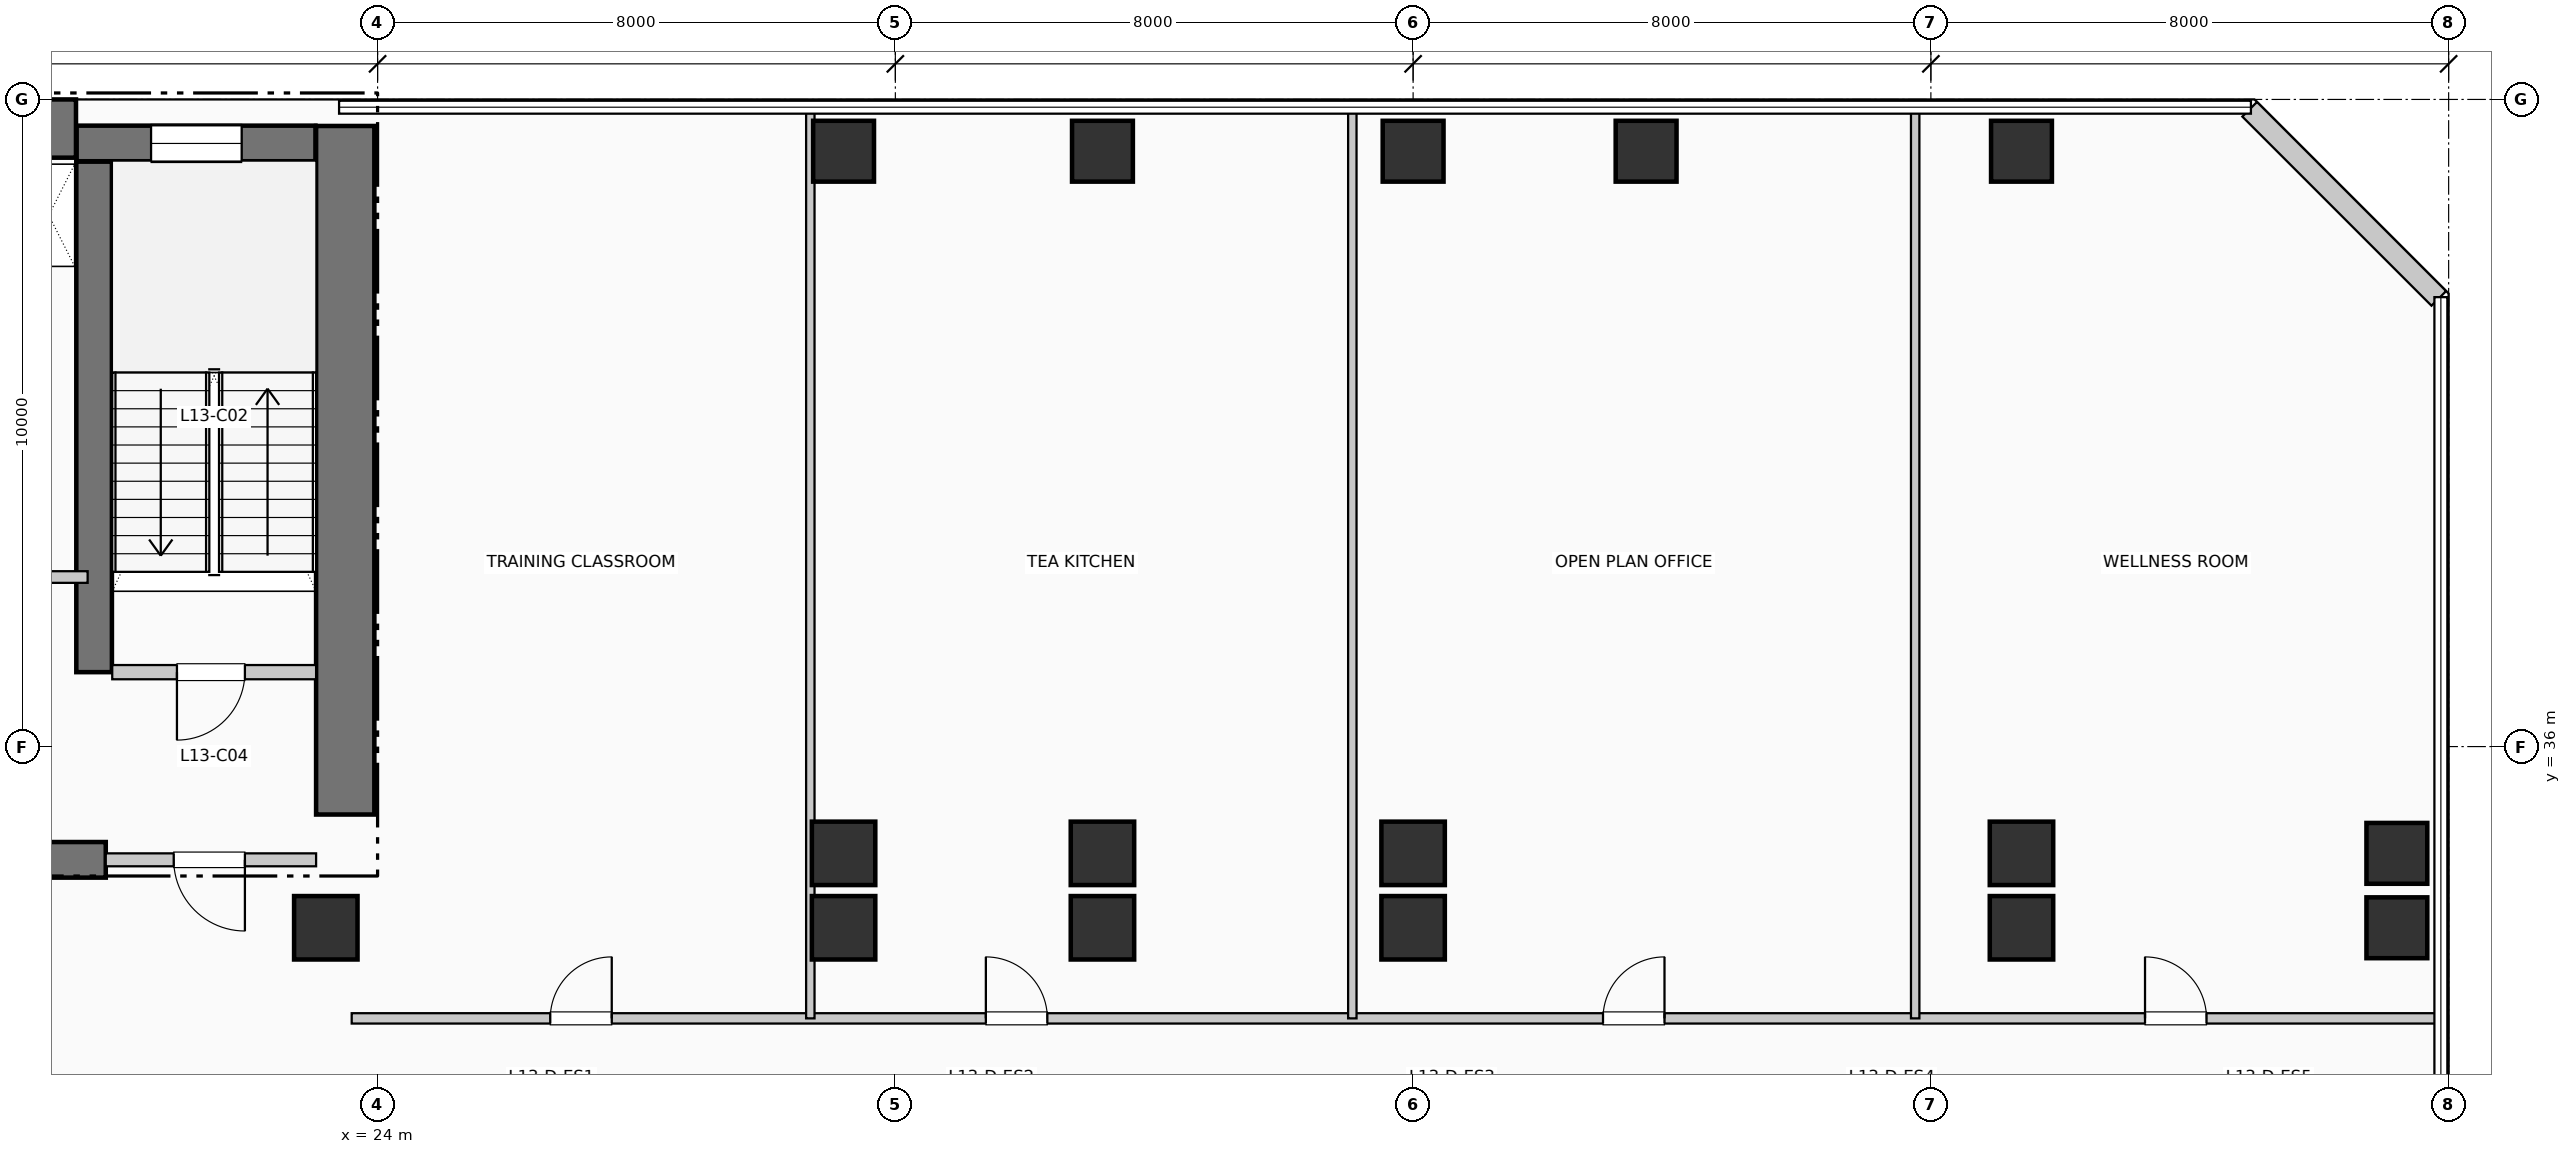
"""IFC4 building model, lengths in metres.
Left out: names, types, materials, properties, quantities, classifications, styles, units other than length and angle.
Written with IfcOpenShell. Run it as: python <this file> out.ifc"""

import sys

from ifc_helpers import new_model, si_unit, direction, frame, frame_2d, origin, origin_2d, place, context, subcontext, project, spatial, rectangle, extrude, element, fill, save


model = new_model("IFC4")
c1 = context("Model", 3, precision=1e-05, world=origin(), true_north=direction((0.0, 1.0)))
c2 = subcontext(c1, "Body", "Model", "MODEL_VIEW")
j1 = project(units=[si_unit("LENGTHUNIT", "METRE"), si_unit("PLANEANGLEUNIT", "RADIAN")], contexts=[c1])
p1 = place(None, origin())
s1 = spatial("IfcSite", under=j1, at=p1, CompositionType="ELEMENT")
p2 = place(p1, origin())
s2 = spatial("IfcBuilding", under=s1, at=p2, CompositionType="ELEMENT")
p3 = place(p2, frame((0.0, 0.0, 58.08)))
s3 = spatial("IfcBuildingStorey", under=s2, at=p3, CompositionType="ELEMENT", Elevation=58.08)
p4 = place(p3, frame((5.36, 45.55, 0.0), z_axis=(0.0, 0.0, 1.0), x_axis=(1.0, 0.0, 0.0)))
e1 = element("IfcWall", 1, at=p4, inside=s3, PredefinedType="SHEAR", context=c2, shape_type="SweptSolid", body=[
    extrude(rectangle(XDim=13.98, YDim=0.9, at=frame_2d((6.99, 0.0))), origin(), (0.0, 0.0, 1.0), 3.96),
])
p5 = place(p3, frame((23.5, 34.95, 0.0), z_axis=(0.0, 0.0, 1.0), x_axis=(0.0, 1.0, 0.0)))
e2 = element("IfcWall", 2, at=p5, inside=s3, PredefinedType="SHEAR", context=c2, shape_type="SweptSolid", body=[
    extrude(rectangle(XDim=10.64, YDim=0.9, at=frame_2d((5.32, 0.0))), origin(), (0.0, 0.0, 1.0), 3.96),
])
p6 = place(p3, frame((13.68, 34.25, 0.0), z_axis=(0.0, 0.0, 1.0), x_axis=(1.0, 0.0, 0.0)))
e3 = element("IfcWall", 3, at=p6, inside=s3, PredefinedType="SHEAR", context=c2, shape_type="SweptSolid", body=[
    extrude(rectangle(XDim=6.12, YDim=0.55, at=frame_2d((3.06, 0.0))), origin(), (0.0, 0.0, 1.0), 3.96),
])
p7 = place(p3, frame((19.62, 37.15, 0.0), z_axis=(0.0, 0.0, 1.0), x_axis=(0.0, 1.0, 0.0)))
e4 = element("IfcWall", 4, at=p7, inside=s3, PredefinedType="SHEAR", context=c2, shape_type="SweptSolid", body=[
    extrude(rectangle(XDim=7.89, YDim=0.55, at=frame_2d((3.945, 0.0))), origin(), (0.0, 0.0, 1.0), 3.96),
])
p8 = place(p3, frame((19.35, 45.32, 0.0), z_axis=(0.0, 0.0, 1.0), x_axis=(1.0, 0.0, 0.0)))
e5 = element("IfcWall", 5, at=p8, inside=s3, PredefinedType="SHEAR", context=c2, shape_type="SweptSolid", body=[
    extrude(rectangle(XDim=3.69, YDim=0.55, at=frame_2d((1.845, 0.0))), origin(), (0.0, 0.0, 1.0), 3.96),
])
p9 = place(p8, frame((1.15, 0.0, 1.05)))
e6 = element("IfcOpeningElement", 6, at=p9, cuts=e5, PredefinedType="OPENING", context=c2, shape_type="SweptSolid", body=[
    extrude(rectangle(XDim=1.4, YDim=1.8, at=frame_2d((0.7, 0.9))), frame((0.0, 0.285, 0.0), z_axis=(0.0, -1.0, 0.0), x_axis=(1.0, 0.0, 0.0)), (0.0, 0.0, 1.0), 0.57),
])
for number, where, z_axis, x_axis in (
    (7, (23.2, 33.2, 0.0), (0.0, 0.0, 1.0), (1.0, 0.0, 0.0)),
    (8, (31.2, 33.2, 0.0), (0.0, 0.0, 1.0), (1.0, 0.0, 0.0)),
    (9, (31.2, 34.35, 0.0), (0.0, 0.0, 1.0), (1.0, 0.0, 0.0)),
):
    element("IfcColumn", number, at=place(p3, frame(where, z_axis=z_axis, x_axis=x_axis)), inside=s3, PredefinedType="COLUMN", context=c2, shape_type="SweptSolid", body=[
        extrude(rectangle(XDim=0.98, YDim=0.98, at=origin_2d()), origin(), (0.0, 0.0, 1.0), 3.96),
    ])
p10 = place(p3, frame((31.2, 45.2, 0.0), z_axis=(0.0, 0.0, 1.0), x_axis=(1.0, 0.0, 0.0)))
e10 = element("IfcColumn", 10, at=p10, inside=s3, PredefinedType="COLUMN", context=c2, shape_type="SweptSolid", body=[
    extrude(rectangle(XDim=0.94, YDim=0.94, at=origin_2d()), origin(), (0.0, 0.0, 1.0), 3.96),
])
for number, where, z_axis, x_axis in (
    (11, (35.2, 33.2, 0.0), (0.0, 0.0, 1.0), (1.0, 0.0, 0.0)),
    (12, (35.2, 34.35, 0.0), (0.0, 0.0, 1.0), (1.0, 0.0, 0.0)),
):
    element("IfcColumn", number, at=place(p3, frame(where, z_axis=z_axis, x_axis=x_axis)), inside=s3, PredefinedType="COLUMN", context=c2, shape_type="SweptSolid", body=[
        extrude(rectangle(XDim=0.98, YDim=0.98, at=origin_2d()), origin(), (0.0, 0.0, 1.0), 3.96),
    ])
p11 = place(p3, frame((35.2, 45.2, 0.0), z_axis=(0.0, 0.0, 1.0), x_axis=(1.0, 0.0, 0.0)))
e13 = element("IfcColumn", 13, at=p11, inside=s3, PredefinedType="COLUMN", context=c2, shape_type="SweptSolid", body=[
    extrude(rectangle(XDim=0.94, YDim=0.94, at=origin_2d()), origin(), (0.0, 0.0, 1.0), 3.96),
])
for number, where, z_axis, x_axis in (
    (14, (40.0, 33.2, 0.0), (0.0, 0.0, 1.0), (1.0, 0.0, 0.0)),
    (15, (40.0, 34.35, 0.0), (0.0, 0.0, 1.0), (1.0, 0.0, 0.0)),
):
    element("IfcColumn", number, at=place(p3, frame(where, z_axis=z_axis, x_axis=x_axis)), inside=s3, PredefinedType="COLUMN", context=c2, shape_type="SweptSolid", body=[
        extrude(rectangle(XDim=0.98, YDim=0.98, at=origin_2d()), origin(), (0.0, 0.0, 1.0), 3.96),
    ])
for number, where, z_axis, x_axis in (
    (16, (40.0, 45.2, 0.0), (0.0, 0.0, 1.0), (1.0, 0.0, 0.0)),
    (17, (43.6, 45.2, 0.0), (0.0, 0.0, 1.0), (1.0, 0.0, 0.0)),
):
    element("IfcColumn", number, at=place(p3, frame(where, z_axis=z_axis, x_axis=x_axis)), inside=s3, PredefinedType="COLUMN", context=c2, shape_type="SweptSolid", body=[
        extrude(rectangle(XDim=0.94, YDim=0.94, at=origin_2d()), origin(), (0.0, 0.0, 1.0), 3.96),
    ])
for number, where, z_axis, x_axis in (
    (18, (49.4, 33.2, 0.0), (0.0, 0.0, 1.0), (1.0, 0.0, 0.0)),
    (19, (49.4, 34.35, 0.0), (0.0, 0.0, 1.0), (1.0, 0.0, 0.0)),
):
    element("IfcColumn", number, at=place(p3, frame(where, z_axis=z_axis, x_axis=x_axis)), inside=s3, PredefinedType="COLUMN", context=c2, shape_type="SweptSolid", body=[
        extrude(rectangle(XDim=0.98, YDim=0.98, at=origin_2d()), origin(), (0.0, 0.0, 1.0), 3.96),
    ])
for number, where, z_axis, x_axis in (
    (20, (49.4, 45.2, 0.0), (0.0, 0.0, 1.0), (1.0, 0.0, 0.0)),
    (21, (55.2, 33.2, 0.0), (0.0, 0.0, 1.0), (1.0, 0.0, 0.0)),
    (22, (55.2, 34.35, 0.0), (0.0, 0.0, 1.0), (1.0, 0.0, 0.0)),
):
    element("IfcColumn", number, at=place(p3, frame(where, z_axis=z_axis, x_axis=x_axis)), inside=s3, PredefinedType="COLUMN", context=c2, shape_type="SweptSolid", body=[
        extrude(rectangle(XDim=0.94, YDim=0.94, at=origin_2d()), origin(), (0.0, 0.0, 1.0), 3.96),
    ])
p12 = place(p3, frame((55.848, 42.926, 0.0), z_axis=(0.0, 0.0, 1.0), x_axis=(-0.707106781187, 0.707106781187, 0.0)))
e23 = element("IfcWall", 23, at=p12, inside=s3, PredefinedType="SOLIDWALL", context=c2, shape_type="SweptSolid", body=[
    extrude(rectangle(XDim=4.133, YDim=0.32, at=frame_2d((2.066, 0.0))), origin(), (0.0, 0.0, 1.0), 3.71),
])
p13 = place(p3, frame((19.9, 37.15, 0.0), z_axis=(0.0, 0.0, 1.0), x_axis=(1.0, 0.0, 0.0)))
e24 = element("IfcWall", 24, at=p13, inside=s3, PredefinedType="PARTITIONING", context=c2, shape_type="SweptSolid", body=[
    extrude(rectangle(XDim=3.15, YDim=0.22, at=frame_2d((1.575, 0.0))), origin(), (0.0, 0.0, 1.0), 3.71),
])
p14 = place(p13, frame((2.05, 0.0, 0.0), z_axis=(0.0, 0.0, 1.0), x_axis=(-1.0, 0.0, 0.0)))
e25 = element("IfcOpeningElement", 25, at=p14, cuts=e24, PredefinedType="OPENING", context=c2, shape_type="SweptSolid", body=[
    extrude(rectangle(XDim=1.05, YDim=2.15, at=frame_2d((0.525, 1.075))), frame((0.0, 0.12, 0.0), z_axis=(0.0, -1.0, 0.0), x_axis=(1.0, 0.0, 0.0)), (0.0, 0.0, 1.0), 0.24),
])
p15 = place(p3, frame((19.8, 34.25, 0.0), z_axis=(0.0, 0.0, 1.0), x_axis=(1.0, 0.0, 0.0)))
e26 = element("IfcWall", 26, at=p15, inside=s3, PredefinedType="PARTITIONING", context=c2, shape_type="SweptSolid", body=[
    extrude(rectangle(XDim=3.25, YDim=0.2, at=frame_2d((1.625, 0.0))), origin(), (0.0, 0.0, 1.0), 3.71),
])
p16 = place(p15, frame((2.15, 0.0, 0.0), z_axis=(0.0, 0.0, 1.0), x_axis=(-1.0, 0.0, 0.0)))
e27 = element("IfcOpeningElement", 27, at=p16, cuts=e26, PredefinedType="OPENING", context=c2, shape_type="SweptSolid", body=[
    extrude(rectangle(XDim=1.1, YDim=2.15, at=frame_2d((0.55, 1.075))), frame((0.0, 0.11, 0.0), z_axis=(0.0, -1.0, 0.0), x_axis=(1.0, 0.0, 0.0)), (0.0, 0.0, 1.0), 0.22),
])
p17 = place(p3, frame((17.68, 38.62, 0.0), z_axis=(0.0, 0.0, 1.0), x_axis=(1.0, 0.0, 0.0)))
e28 = element("IfcWall", 28, at=p17, inside=s3, PredefinedType="PARTITIONING", context=c2, shape_type="SweptSolid", body=[
    extrude(rectangle(XDim=1.84, YDim=0.18, at=frame_2d((0.92, 0.0))), origin(), (0.0, 0.0, 1.0), 3.71),
])
p18 = place(p17, frame((0.24, 0.0, 0.0)))
e29 = element("IfcOpeningElement", 29, at=p18, cuts=e28, PredefinedType="OPENING", context=c2, shape_type="SweptSolid", body=[
    extrude(rectangle(XDim=0.92, YDim=2.1, at=frame_2d((0.46, 1.05))), frame((0.0, 0.1, 0.0), z_axis=(0.0, -1.0, 0.0), x_axis=(1.0, 0.0, 0.0)), (0.0, 0.0, 1.0), 0.2),
])
p19 = place(p3, frame((23.6, 31.8, 0.0), z_axis=(0.0, 0.0, 1.0), x_axis=(1.0, 0.0, 0.0)))
e30 = element("IfcWall", 30, at=p19, inside=s3, PredefinedType="PARTITIONING", context=c2, shape_type="SweptSolid", body=[
    extrude(rectangle(XDim=32.21, YDim=0.16, at=frame_2d((16.105, 0.0))), origin(), (0.0, 0.0, 1.0), 3.71),
])
p20 = place(p19, frame((3.068, 0.0, 0.0)))
e31 = element("IfcOpeningElement", 31, at=p20, cuts=e30, PredefinedType="OPENING", context=c2, shape_type="SweptSolid", body=[
    extrude(rectangle(XDim=0.95, YDim=2.15, at=frame_2d((0.475, 1.075))), frame((0.0, 0.09, 0.0), z_axis=(0.0, -1.0, 0.0), x_axis=(1.0, 0.0, 0.0)), (0.0, 0.0, 1.0), 0.18),
])
p21 = place(p19, frame((9.799, 0.0, 0.0)))
e32 = element("IfcOpeningElement", 32, at=p21, cuts=e30, PredefinedType="OPENING", context=c2, shape_type="SweptSolid", body=[
    extrude(rectangle(XDim=0.95, YDim=2.15, at=frame_2d((0.475, 1.075))), frame((0.0, 0.09, 0.0), z_axis=(0.0, -1.0, 0.0), x_axis=(1.0, 0.0, 0.0)), (0.0, 0.0, 1.0), 0.18),
])
p22 = place(p19, frame((19.334, 0.0, 0.0)))
e33 = element("IfcOpeningElement", 33, at=p22, cuts=e30, PredefinedType="OPENING", context=c2, shape_type="SweptSolid", body=[
    extrude(rectangle(XDim=0.95, YDim=2.15, at=frame_2d((0.475, 1.075))), frame((0.0, 0.09, 0.0), z_axis=(0.0, -1.0, 0.0), x_axis=(1.0, 0.0, 0.0)), (0.0, 0.0, 1.0), 0.18),
])
p23 = place(p19, frame((27.709, 0.0, 0.0)))
e34 = element("IfcOpeningElement", 34, at=p23, cuts=e30, PredefinedType="OPENING", context=c2, shape_type="SweptSolid", body=[
    extrude(rectangle(XDim=0.95, YDim=2.15, at=frame_2d((0.475, 1.075))), frame((0.0, 0.09, 0.0), z_axis=(0.0, -1.0, 0.0), x_axis=(1.0, 0.0, 0.0)), (0.0, 0.0, 1.0), 0.18),
])
for number, where, z_axis, x_axis in (
    (35, (30.686, 31.8, 0.0), (0.0, 0.0, 1.0), (0.0, 1.0, 0.0)),
    (36, (39.061, 31.8, 0.0), (0.0, 0.0, 1.0), (0.0, 1.0, 0.0)),
    (37, (47.758, 31.8, 0.0), (0.0, 0.0, 1.0), (0.0, 1.0, 0.0)),
):
    element("IfcWall", number, at=place(p3, frame(where, z_axis=z_axis, x_axis=x_axis)), inside=s3, PredefinedType="PARTITIONING", context=c2, shape_type="SweptSolid", body=[
        extrude(rectangle(XDim=14.01, YDim=0.13, at=frame_2d((7.005, 0.0))), origin(), (0.0, 0.0, 1.0), 3.71),
    ])
p24 = place(p9, origin())
e38 = element("IfcWindow", 38, at=p24, inside=s3, PartitioningType="SINGLE_PANEL", PredefinedType="WINDOW", context=c2, shape_type="SweptSolid", body=[
    extrude(rectangle(XDim=1.4, YDim=1.8, at=frame_2d((0.7, 0.9))), frame((0.0, 0.03, 0.0), z_axis=(0.0, -1.0, 0.0), x_axis=(1.0, 0.0, 0.0)), (0.0, 0.0, 1.0), 0.06),
])
fill(e6, e38)
p25 = place(p14, origin())
e39 = element("IfcDoor", 39, at=p25, inside=s3, OperationType="SINGLE_SWING_LEFT", PredefinedType="DOOR", context=c2, shape_type="SweptSolid", body=[
    extrude(rectangle(XDim=1.05, YDim=2.15, at=frame_2d((0.525, 1.075))), frame((0.0, 0.025, 0.0), z_axis=(0.0, -1.0, 0.0), x_axis=(1.0, 0.0, 0.0)), (0.0, 0.0, 1.0), 0.05),
])
fill(e25, e39)
p26 = place(p16, origin())
e40 = element("IfcDoor", 40, at=p26, inside=s3, OperationType="SINGLE_SWING_RIGHT", PredefinedType="DOOR", context=c2, shape_type="SweptSolid", body=[
    extrude(rectangle(XDim=1.1, YDim=2.15, at=frame_2d((0.55, 1.075))), frame((0.0, 0.025, 0.0), z_axis=(0.0, -1.0, 0.0), x_axis=(1.0, 0.0, 0.0)), (0.0, 0.0, 1.0), 0.05),
])
fill(e27, e40)
p27 = place(p20, origin())
e41 = element("IfcDoor", 41, at=p27, inside=s3, OperationType="SINGLE_SWING_RIGHT", PredefinedType="DOOR", context=c2, shape_type="SweptSolid", body=[
    extrude(rectangle(XDim=0.95, YDim=2.15, at=frame_2d((0.475, 1.075))), frame((0.0, 0.025, 0.0), z_axis=(0.0, -1.0, 0.0), x_axis=(1.0, 0.0, 0.0)), (0.0, 0.0, 1.0), 0.05),
])
fill(e31, e41)
p28 = place(p21, origin())
e42 = element("IfcDoor", 42, at=p28, inside=s3, OperationType="SINGLE_SWING_LEFT", PredefinedType="DOOR", context=c2, shape_type="SweptSolid", body=[
    extrude(rectangle(XDim=0.95, YDim=2.15, at=frame_2d((0.475, 1.075))), frame((0.0, 0.025, 0.0), z_axis=(0.0, -1.0, 0.0), x_axis=(1.0, 0.0, 0.0)), (0.0, 0.0, 1.0), 0.05),
])
fill(e32, e42)
p29 = place(p22, origin())
e43 = element("IfcDoor", 43, at=p29, inside=s3, OperationType="SINGLE_SWING_RIGHT", PredefinedType="DOOR", context=c2, shape_type="SweptSolid", body=[
    extrude(rectangle(XDim=0.95, YDim=2.15, at=frame_2d((0.475, 1.075))), frame((0.0, 0.025, 0.0), z_axis=(0.0, -1.0, 0.0), x_axis=(1.0, 0.0, 0.0)), (0.0, 0.0, 1.0), 0.05),
])
fill(e33, e43)
p30 = place(p23, origin())
e44 = element("IfcDoor", 44, at=p30, inside=s3, OperationType="SINGLE_SWING_LEFT", PredefinedType="DOOR", context=c2, shape_type="SweptSolid", body=[
    extrude(rectangle(XDim=0.95, YDim=2.15, at=frame_2d((0.475, 1.075))), frame((0.0, 0.025, 0.0), z_axis=(0.0, -1.0, 0.0), x_axis=(1.0, 0.0, 0.0)), (0.0, 0.0, 1.0), 0.05),
])
fill(e34, e44)
save(model, sys.argv[1])
